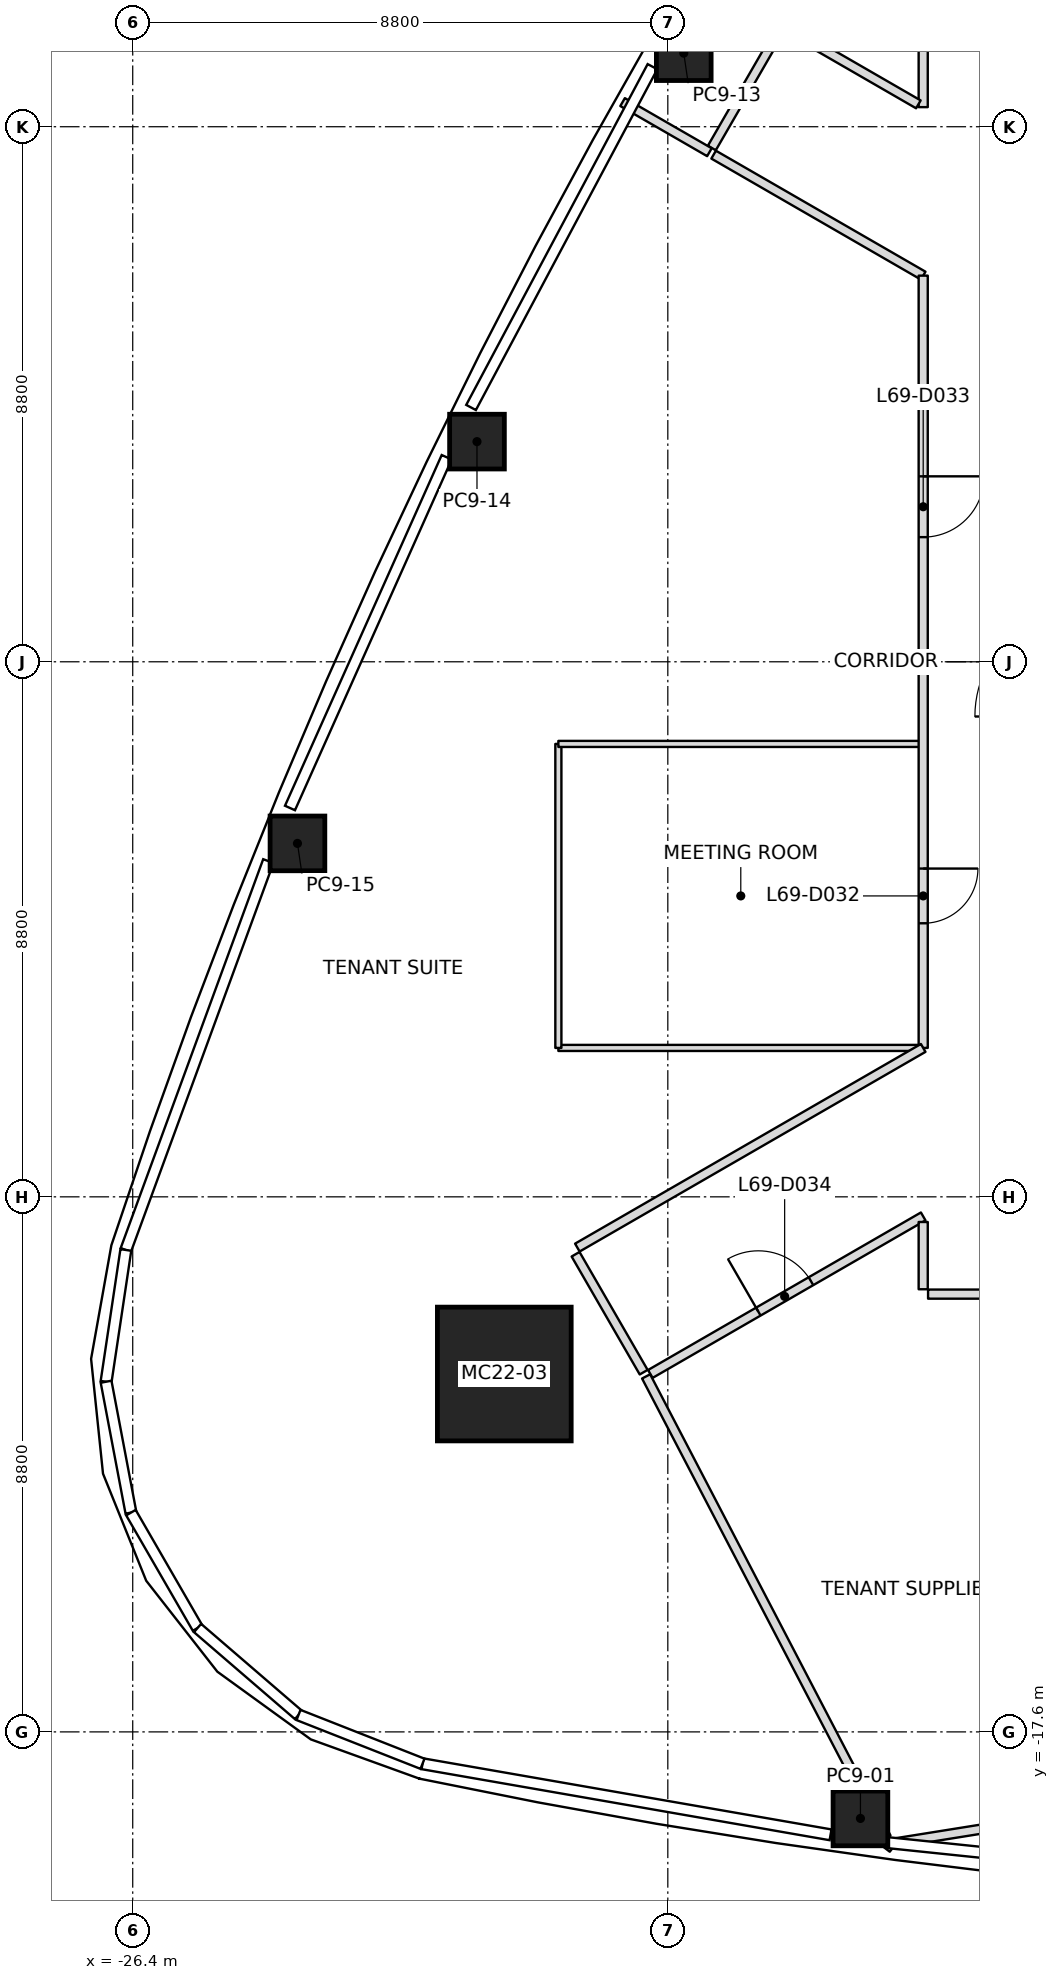
"""IFC4 building model, lengths in metres.
Left out: names, types, materials, properties, quantities, classifications, styles, units other than length and angle.
Written with IfcOpenShell. Run it as: python <this file> out.ifc"""

import sys

from ifc_helpers import new_model, si_unit, direction, frame, frame_2d, origin, origin_2d, place, context, subcontext, project, spatial, rectangle, extrude, element, fill, save


model = new_model("IFC4")
c1 = context("Model", 3, precision=1e-05, world=origin(), true_north=direction((0.0, 1.0)))
c2 = subcontext(c1, "Body", "Model", "MODEL_VIEW")
j1 = project(units=[si_unit("LENGTHUNIT", "METRE"), si_unit("PLANEANGLEUNIT", "RADIAN")], contexts=[c1])
p1 = place(None, origin())
s1 = spatial("IfcSite", under=j1, at=p1, CompositionType="ELEMENT")
p2 = place(p1, origin())
s2 = spatial("IfcBuilding", under=s1, at=p2, CompositionType="ELEMENT")
p3 = place(p2, frame((0.0, 0.0, 303.0)))
s3 = spatial("IfcBuildingStorey", under=s2, at=p3, CompositionType="ELEMENT", Elevation=303.0)
p4 = place(p3, frame((-20.289, -11.714, 0.0), z_axis=(0.027756720281, 0.01604399436, 0.999485945236), x_axis=(0.999614708015, -0.000445500311, -0.027753144871)))
e1 = element("IfcColumn", 1, at=p4, inside=s3, PredefinedType="COLUMN", context=c2, shape_type="SweptSolid", body=[
    extrude(rectangle(XDim=2.2, YDim=2.2, at=origin_2d()), origin(), (0.0, 0.0, 1.0), 4.002),
])
p5 = place(p3, frame((-14.432, -19.023, 0.0), z_axis=(0.017391452496, 0.010373848857, 0.999794939295), x_axis=(-0.990356057781, 0.137641808402, 0.01579909479)))
e2 = element("IfcColumn", 2, at=p5, inside=s3, PredefinedType="COLUMN", context=c2, shape_type="SweptSolid", body=[
    extrude(rectangle(XDim=0.9, YDim=0.9, at=origin_2d()), origin(), (0.0, 0.0, 1.0), 4.001),
])
p6 = place(p3, frame((-17.338, 10.01, 0.0), z_axis=(0.009948074445, -0.005736926367, 0.999934059571), x_axis=(0.499975258342, 0.8660396879, -5.385525e-06)))
e3 = element("IfcColumn", 3, at=p6, inside=s3, PredefinedType="COLUMN", context=c2, shape_type="SweptSolid", body=[
    extrude(rectangle(XDim=0.9, YDim=0.9, at=origin_2d()), origin(), (0.0, 0.0, 1.0), 4.0),
])
p7 = place(p3, frame((-20.738, 3.621, 0.0), z_axis=(0.013975659066, 0.001952930525, 0.999900428551), x_axis=(0.439099892743, 0.898403584297, -0.007892015999)))
e4 = element("IfcColumn", 4, at=p7, inside=s3, PredefinedType="COLUMN", context=c2, shape_type="SweptSolid", body=[
    extrude(rectangle(XDim=0.9, YDim=0.9, at=origin_2d()), origin(), (0.0, 0.0, 1.0), 4.0),
])
p8 = place(p3, frame((-23.691, -2.987, 0.0), z_axis=(0.017696558482, 0.009885663704, 0.999794531627), x_axis=(0.376141094999, 0.926427367608, -0.015818002387)))
e5 = element("IfcColumn", 5, at=p8, inside=s3, PredefinedType="COLUMN", context=c2, shape_type="SweptSolid", body=[
    extrude(rectangle(XDim=0.9, YDim=0.9, at=origin_2d()), origin(), (0.0, 0.0, 1.0), 4.001),
])
p9 = place(p3, frame((-16.916, 8.381, 0.0), z_axis=(0.0, 0.0, 1.0), x_axis=(-0.866047486323, 0.49996174997, 0.0)))
e6 = element("IfcWall", 6, at=p9, inside=s3, PredefinedType="PARTITIONING", context=c2, shape_type="SweptSolid", body=[
    extrude(rectangle(XDim=1.649, YDim=0.15, at=frame_2d((0.824, 0.0))), origin(), (0.0, 0.0, 1.0), 3.234),
])
p10 = place(p3, frame((-17.957, -11.753, 0.0), z_axis=(0.0, 0.0, 1.0), x_axis=(0.462142572693, -0.886805639644, 0.0)))
e7 = element("IfcWall", 7, at=p10, inside=s3, PredefinedType="PARTITIONING", context=c2, shape_type="SweptSolid", body=[
    extrude(rectangle(XDim=8.553, YDim=0.15, at=frame_2d((4.276, 0.0))), origin(), (0.0, 0.0, 1.0), 3.3),
])
p11 = place(p3, frame((-10.2, -18.84, 0.0), z_axis=(0.0, 0.0, 1.0), x_axis=(-0.987451332471, -0.157923608119, 0.0)))
e8 = element("IfcWall", 8, at=p11, inside=s3, PredefinedType="PARTITIONING", context=c2, shape_type="SweptSolid", body=[
    extrude(rectangle(XDim=3.701, YDim=0.15, at=frame_2d((1.851, 0.0))), origin(), (0.0, 0.0, 1.0), 3.234),
])
p12 = place(p3, frame((-13.905, -19.511, 0.0), z_axis=(0.0, 0.0, 1.0), x_axis=(-0.796009034685, 0.605284740185, 0.0)))
e9 = element("IfcWall", 9, at=p12, inside=s3, PredefinedType="PARTITIONING", context=c2, shape_type="SweptSolid", body=[
    extrude(rectangle(XDim=0.184, YDim=0.15, at=frame_2d((0.092, 0.0))), origin(), (0.0, 0.0, 1.0), 3.3),
])
p13 = place(p3, frame((-19.117, -9.744, 0.0), z_axis=(0.0, 0.0, 1.0), x_axis=(0.500030632641, -0.866007717299, 0.0)))
e10 = element("IfcWall", 10, at=p13, inside=s3, PredefinedType="PARTITIONING", context=c2, shape_type="SweptSolid", body=[
    extrude(rectangle(XDim=2.24, YDim=0.15, at=frame_2d((1.12, 0.0))), origin(), (0.0, 0.0, 1.0), 3.233),
])
p14 = place(p3, frame((-16.847, 8.341, 0.0), z_axis=(0.0, 0.0, 1.0), x_axis=(0.866026229868, -0.499998569178, 0.0)))
e11 = element("IfcWall", 11, at=p14, inside=s3, PredefinedType="PARTITIONING", context=c2, shape_type="SweptSolid", body=[
    extrude(rectangle(XDim=3.98, YDim=0.15, at=frame_2d((1.99, 0.0))), origin(), (0.0, 0.0, 1.0), 3.3),
])
p15 = place(p3, frame((-13.4, 6.351, 0.0), z_axis=(0.0, 0.0, 1.0), x_axis=(0.0, -1.0, 0.0)))
e12 = element("IfcWall", 12, at=p15, inside=s3, PredefinedType="PARTITIONING", context=c2, shape_type="SweptSolid", body=[
    extrude(rectangle(XDim=12.702, YDim=0.15, at=frame_2d((6.351, 0.0))), origin(), (0.0, 0.0, 1.0), 3.3),
])
p16 = place(p15, frame((9.752, 0.0, 0.0)))
e13 = element("IfcOpeningElement", 13, at=p16, cuts=e12, PredefinedType="OPENING", context=c2, shape_type="SweptSolid", body=[
    extrude(rectangle(XDim=0.9, YDim=2.1, at=frame_2d((0.45, 1.05))), frame((0.0, 0.075, 0.0), z_axis=(0.0, -1.0, 0.0), x_axis=(1.0, 0.0, 0.0)), (0.0, 0.0, 1.0), 0.15),
])
p17 = place(p15, frame((3.301, 0.0, 0.0)))
e14 = element("IfcOpeningElement", 14, at=p17, cuts=e12, PredefinedType="OPENING", context=c2, shape_type="SweptSolid", body=[
    extrude(rectangle(XDim=1.0, YDim=2.1, at=frame_2d((0.5, 1.05))), frame((0.0, 0.075, 0.0), z_axis=(0.0, -1.0, 0.0), x_axis=(1.0, 0.0, 0.0)), (0.0, 0.0, 1.0), 0.15),
])
p18 = place(p3, frame((-13.4, -6.351, 0.0), z_axis=(0.0, 0.0, 1.0), x_axis=(-0.866027119138, -0.499997028909, 0.0)))
e15 = element("IfcWall", 15, at=p18, inside=s3, PredefinedType="PARTITIONING", context=c2, shape_type="SweptSolid", body=[
    extrude(rectangle(XDim=6.568, YDim=0.15, at=frame_2d((3.284, 0.0))), origin(), (0.0, 0.0, 1.0), 3.3),
])
p19 = place(p3, frame((-17.888, -11.713, 0.0), z_axis=(0.0, 0.0, 1.0), x_axis=(0.866022397746, 0.500005206576, 0.0)))
e16 = element("IfcWall", 16, at=p19, inside=s3, PredefinedType="PARTITIONING", context=c2, shape_type="SweptSolid", body=[
    extrude(rectangle(XDim=5.182, YDim=0.15, at=frame_2d((2.591, 0.0))), origin(), (0.0, 0.0, 1.0), 3.233),
])
p20 = place(p19, frame((2.051, 0.0, 0.0)))
e17 = element("IfcOpeningElement", 17, at=p20, cuts=e16, PredefinedType="OPENING", context=c2, shape_type="SweptSolid", body=[
    extrude(rectangle(XDim=1.0, YDim=2.1, at=frame_2d((0.5, 1.05))), frame((0.0, 0.075, 0.0), z_axis=(0.0, -1.0, 0.0), x_axis=(1.0, 0.0, 0.0)), (0.0, 0.0, 1.0), 0.15),
])
p21 = place(p3, frame((-13.4, -9.214, 0.0), z_axis=(0.0, 0.0, 1.0), x_axis=(0.0, -1.0, 0.0)))
e18 = element("IfcWall", 18, at=p21, inside=s3, PredefinedType="PARTITIONING", context=c2, shape_type="SweptSolid", body=[
    extrude(rectangle(XDim=1.106, YDim=0.15, at=frame_2d((0.553, 0.0))), origin(), (0.0, 0.0, 1.0), 3.233),
])
p22 = place(p3, frame((-15.756, 10.39, 0.0), z_axis=(0.0, 0.0, 1.0), x_axis=(-0.500077830873, -0.865980463445, 0.0)))
e19 = element("IfcWall", 19, at=p22, inside=s3, PredefinedType="PARTITIONING", context=c2, shape_type="SweptSolid", body=[
    extrude(rectangle(XDim=2.24, YDim=0.15, at=frame_2d((1.12, 0.0))), origin(), (0.0, 0.0, 1.0), 3.3),
])
p23 = place(p3, frame((-13.4, 10.32, 0.0), z_axis=(0.0, 0.0, 1.0), x_axis=(0.0, -1.0, 0.0)))
e20 = element("IfcWall", 20, at=p23, inside=s3, PredefinedType="PARTITIONING", context=c2, shape_type="SweptSolid", body=[
    extrude(rectangle(XDim=1.198, YDim=0.15, at=frame_2d((0.599, 0.0))), origin(), (0.0, 0.0, 1.0), 3.3),
])
p24 = place(p3, frame((-13.479, 9.168, 0.0), z_axis=(0.0, 0.0, 1.0), x_axis=(-0.866051946521, 0.499954023813, 0.0)))
e21 = element("IfcWall", 21, at=p24, inside=s3, PredefinedType="PARTITIONING", context=c2, shape_type="SweptSolid", body=[
    extrude(rectangle(XDim=2.464, YDim=0.15, at=frame_2d((1.232, 0.0))), origin(), (0.0, 0.0, 1.0), 3.3),
])
p25 = place(p3, frame((-13.32, -10.4, 0.0), z_axis=(0.0, 0.0, 1.0), x_axis=(1.0, 0.0, 0.0)))
e22 = element("IfcWall", 22, at=p25, inside=s3, PredefinedType="PARTITIONING", context=c2, shape_type="SweptSolid", body=[
    extrude(rectangle(XDim=12.12, YDim=0.15, at=frame_2d((6.06, 0.0))), origin(), (0.0, 0.0, 1.0), 3.3),
])
p26 = place(p25, frame((7.12, 0.0, 0.0)))
e23 = element("IfcOpeningElement", 23, at=p26, cuts=e22, PredefinedType="OPENING", context=c2, shape_type="SweptSolid", body=[
    extrude(rectangle(XDim=1.0, YDim=2.1, at=frame_2d((0.5, 1.05))), frame((0.0, 0.075, 0.0), z_axis=(0.0, -1.0, 0.0), x_axis=(1.0, 0.0, 0.0)), (0.0, 0.0, 1.0), 0.15),
])
p27 = place(p3, frame((-13.46, -6.351, 0.0), z_axis=(0.0, 0.0, 1.0), x_axis=(-1.0, 0.0, 0.0)))
e24 = element("IfcWall", 24, at=p27, inside=s3, PredefinedType="PARTITIONING", context=c2, shape_type="SweptSolid", body=[
    extrude(rectangle(XDim=5.94, YDim=0.1, at=frame_2d((2.97, 0.0))), origin(), (0.0, 0.0, 1.0), 3.3),
])
p28 = place(p3, frame((-19.4, -6.351, 0.0), z_axis=(0.0, 0.0, 1.0), x_axis=(0.0, 1.0, 0.0)))
e25 = element("IfcWall", 25, at=p28, inside=s3, PredefinedType="PARTITIONING", context=c2, shape_type="SweptSolid", body=[
    extrude(rectangle(XDim=5.0, YDim=0.1, at=frame_2d((2.5, 0.0))), origin(), (0.0, 0.0, 1.0), 3.3),
])
p29 = place(p3, frame((-19.4, -1.351, 0.0), z_axis=(0.0, 0.0, 1.0), x_axis=(1.0, 0.0, 0.0)))
e26 = element("IfcWall", 26, at=p29, inside=s3, PredefinedType="PARTITIONING", context=c2, shape_type="SweptSolid", body=[
    extrude(rectangle(XDim=5.97, YDim=0.1, at=frame_2d((2.985, 0.0))), origin(), (0.0, 0.0, 1.0), 3.3),
])
p30 = place(p16, origin())
e27 = element("IfcDoor", 27, at=p30, inside=s3, OperationType="SINGLE_SWING_LEFT", PredefinedType="DOOR", context=c2, shape_type="SweptSolid", body=[
    extrude(rectangle(XDim=0.9, YDim=2.1, at=frame_2d((0.45, 1.05))), frame((0.0, 0.025, 0.0), z_axis=(0.0, -1.0, 0.0), x_axis=(1.0, 0.0, 0.0)), (0.0, 0.0, 1.0), 0.05),
])
fill(e13, e27)
p31 = place(p17, origin())
e28 = element("IfcDoor", 28, at=p31, inside=s3, OperationType="SINGLE_SWING_RIGHT", PredefinedType="DOOR", context=c2, shape_type="SweptSolid", body=[
    extrude(rectangle(XDim=1.0, YDim=2.1, at=frame_2d((0.5, 1.05))), frame((0.0, 0.025, 0.0), z_axis=(0.0, -1.0, 0.0), x_axis=(1.0, 0.0, 0.0)), (0.0, 0.0, 1.0), 0.05),
])
fill(e14, e28)
p32 = place(p20, origin())
e29 = element("IfcDoor", 29, at=p32, inside=s3, OperationType="SINGLE_SWING_RIGHT", PredefinedType="DOOR", context=c2, shape_type="SweptSolid", body=[
    extrude(rectangle(XDim=1.0, YDim=2.1, at=frame_2d((0.5, 1.05))), frame((0.0, 0.025, 0.0), z_axis=(0.0, -1.0, 0.0), x_axis=(1.0, 0.0, 0.0)), (0.0, 0.0, 1.0), 0.05),
])
fill(e17, e29)
save(model, sys.argv[1])
